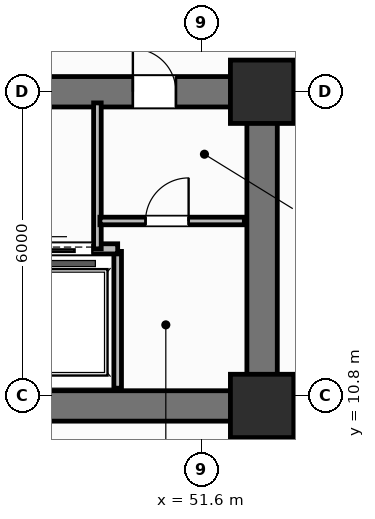
"""IFC4 building model, lengths in metres.
Left out: names, types, materials, properties, quantities, classifications, styles, units other than length and angle.
Written with IfcOpenShell. Run it as: python <this file> out.ifc"""

import sys

from ifc_helpers import new_model, si_unit, direction, frame, frame_2d, origin, origin_2d, place, context, subcontext, project, spatial, rectangle, extrude, element, fill, save


model = new_model("IFC4")
c1 = context("Model", 3, precision=1e-05, world=origin(), true_north=direction((0.0, 1.0)))
c2 = subcontext(c1, "Body", "Model", "MODEL_VIEW")
j1 = project(units=[si_unit("LENGTHUNIT", "METRE"), si_unit("PLANEANGLEUNIT", "RADIAN")], contexts=[c1])
p1 = place(None, origin())
s1 = spatial("IfcSite", under=j1, at=p1, CompositionType="ELEMENT")
p2 = place(p1, origin())
s2 = spatial("IfcBuilding", under=s1, at=p2, CompositionType="ELEMENT")
p3 = place(p2, frame((0.0, 0.0, 24.6)))
s3 = spatial("IfcBuildingStorey", under=s2, at=p3, CompositionType="ELEMENT", Elevation=24.6)
p4 = place(p3, frame((52.8, 10.6, 0.0), z_axis=(0.0, 0.0, 1.0), x_axis=(-1.0, 0.0, 0.0)))
e1 = element("IfcWall", 1, at=p4, inside=s3, PredefinedType="SHEAR", context=c2, shape_type="SweptSolid", body=[
    extrude(rectangle(XDim=27.2, YDim=0.6, at=frame_2d((13.6, 0.0))), origin(), (0.0, 0.0, 1.0), 4.2),
])
p5 = place(p3, frame((52.8, 10.9, 0.0), z_axis=(0.0, 0.0, 1.0), x_axis=(0.0, 1.0, 0.0)))
e2 = element("IfcWall", 2, at=p5, inside=s3, PredefinedType="SHEAR", context=c2, shape_type="SweptSolid", body=[
    extrude(rectangle(XDim=5.6, YDim=0.6, at=frame_2d((2.8, 0.0))), origin(), (0.0, 0.0, 1.0), 4.2),
])
p6 = place(p3, frame((25.6, 16.8, 0.0), z_axis=(0.0, 0.0, 1.0), x_axis=(1.0, 0.0, 0.0)))
e3 = element("IfcWall", 3, at=p6, inside=s3, PredefinedType="SHEAR", context=c2, shape_type="SweptSolid", body=[
    extrude(rectangle(XDim=27.2, YDim=0.6, at=frame_2d((13.6, 0.0))), origin(), (0.0, 0.0, 1.0), 4.2),
])
p7 = place(p6, frame((1.8, 0.0, 0.0)))
e4 = element("IfcOpeningElement", 4, at=p7, cuts=e3, PredefinedType="OPENING", context=c2, shape_type="SweptSolid", body=[
    extrude(rectangle(XDim=1.1, YDim=2.15, at=frame_2d((0.55, 1.075))), frame((0.0, 0.31, 0.0), z_axis=(0.0, -1.0, 0.0), x_axis=(1.0, 0.0, 0.0)), (0.0, 0.0, 1.0), 0.62),
])
p8 = place(p6, frame((5.6, 0.0, 0.0)))
e5 = element("IfcOpeningElement", 5, at=p8, cuts=e3, PredefinedType="OPENING", context=c2, shape_type="SweptSolid", body=[
    extrude(rectangle(XDim=0.85, YDim=2.1, at=frame_2d((0.425, 1.05))), frame((0.0, 0.31, 0.0), z_axis=(0.0, -1.0, 0.0), x_axis=(1.0, 0.0, 0.0)), (0.0, 0.0, 1.0), 0.62),
])
p9 = place(p6, frame((13.0, 0.0, 0.0)))
e6 = element("IfcOpeningElement", 6, at=p9, cuts=e3, PredefinedType="OPENING", context=c2, shape_type="SweptSolid", body=[
    extrude(rectangle(XDim=1.2, YDim=2.15, at=frame_2d((0.6, 1.075))), frame((0.0, 0.31, 0.0), z_axis=(0.0, -1.0, 0.0), x_axis=(1.0, 0.0, 0.0)), (0.0, 0.0, 1.0), 0.62),
])
p10 = place(p6, frame((20.4, 0.0, 0.0)))
e7 = element("IfcOpeningElement", 7, at=p10, cuts=e3, PredefinedType="OPENING", context=c2, shape_type="SweptSolid", body=[
    extrude(rectangle(XDim=1.3, YDim=2.2, at=frame_2d((0.65, 1.1))), frame((0.0, 0.31, 0.0), z_axis=(0.0, -1.0, 0.0), x_axis=(1.0, 0.0, 0.0)), (0.0, 0.0, 1.0), 0.62),
])
p11 = place(p6, frame((24.65, 0.0, 0.0)))
e8 = element("IfcOpeningElement", 8, at=p11, cuts=e3, PredefinedType="OPENING", context=c2, shape_type="SweptSolid", body=[
    extrude(rectangle(XDim=0.85, YDim=2.1, at=frame_2d((0.425, 1.05))), frame((0.0, 0.31, 0.0), z_axis=(0.0, -1.0, 0.0), x_axis=(1.0, 0.0, 0.0)), (0.0, 0.0, 1.0), 0.62),
])
for number, where, z_axis, x_axis in (
    (9, (52.8, 10.6, 0.0), (0.0, 0.0, 1.0), (1.0, 0.0, 0.0)),
    (10, (52.8, 16.8, 0.0), (0.0, 0.0, 1.0), (1.0, 0.0, 0.0)),
):
    element("IfcColumn", number, at=place(p3, frame(where, z_axis=z_axis, x_axis=x_axis)), inside=s3, PredefinedType="COLUMN", context=c2, shape_type="SweptSolid", body=[
        extrude(rectangle(XDim=1.25, YDim=1.25, at=origin_2d()), origin(), (0.0, 0.0, 1.0), 4.2),
    ])
p12 = place(p3, frame((49.95, 10.95, 0.0), z_axis=(0.0, 0.0, 1.0), x_axis=(0.0, 1.0, 0.0)))
e11 = element("IfcWall", 11, at=p12, inside=s3, PredefinedType="PARTITIONING", context=c2, shape_type="SweptSolid", body=[
    extrude(rectangle(XDim=2.7, YDim=0.15, at=frame_2d((1.35, 0.0))), origin(), (0.0, 0.0, 1.0), 3.03),
])
p13 = place(p3, frame((43.55, 13.7, 0.0), z_axis=(0.0, 0.0, 1.0), x_axis=(1.0, 0.0, 0.0)))
e12 = element("IfcWall", 12, at=p13, inside=s3, PredefinedType="PARTITIONING", context=c2, shape_type="SweptSolid", body=[
    extrude(rectangle(XDim=6.4, YDim=0.2, at=frame_2d((3.2, 0.0))), origin(), (0.0, 0.0, 1.0), 3.03),
])
p14 = place(p13, frame((0.7, 0.0, 0.0)))
e13 = element("IfcOpeningElement", 13, at=p14, cuts=e12, PredefinedType="OPENING", context=c2, shape_type="SweptSolid", body=[
    extrude(rectangle(XDim=1.0, YDim=2.15, at=frame_2d((0.5, 1.075))), frame((0.0, 0.11, 0.0), z_axis=(0.0, -1.0, 0.0), x_axis=(1.0, 0.0, 0.0)), (0.0, 0.0, 1.0), 0.22),
])
p15 = place(p13, frame((2.8, 0.0, 0.0)))
e14 = element("IfcOpeningElement", 14, at=p15, cuts=e12, PredefinedType="OPENING", context=c2, shape_type="SweptSolid", body=[
    extrude(rectangle(XDim=1.0, YDim=2.15, at=frame_2d((0.5, 1.075))), frame((0.0, 0.11, 0.0), z_axis=(0.0, -1.0, 0.0), x_axis=(1.0, 0.0, 0.0)), (0.0, 0.0, 1.0), 0.22),
])
p16 = place(p13, frame((4.9, 0.0, 0.0)))
e15 = element("IfcOpeningElement", 15, at=p16, cuts=e12, PredefinedType="OPENING", context=c2, shape_type="SweptSolid", body=[
    extrude(rectangle(XDim=1.0, YDim=2.15, at=frame_2d((0.5, 1.075))), frame((0.0, 0.11, 0.0), z_axis=(0.0, -1.0, 0.0), x_axis=(1.0, 0.0, 0.0)), (0.0, 0.0, 1.0), 0.22),
])
p17 = place(p3, frame((49.55, 13.7, 0.0), z_axis=(0.0, 0.0, 1.0), x_axis=(0.0, 1.0, 0.0)))
e16 = element("IfcWall", 16, at=p17, inside=s3, PredefinedType="PARTITIONING", context=c2, shape_type="SweptSolid", body=[
    extrude(rectangle(XDim=2.88, YDim=0.15, at=frame_2d((1.44, 0.0))), origin(), (0.0, 0.0, 1.0), 3.03),
])
p18 = place(p3, frame((49.6, 14.25, 0.0), z_axis=(0.0, 0.0, 1.0), x_axis=(1.0, 0.0, 0.0)))
e17 = element("IfcWall", 17, at=p18, inside=s3, PredefinedType="PARTITIONING", context=c2, shape_type="SweptSolid", body=[
    extrude(rectangle(XDim=2.85, YDim=0.15, at=frame_2d((1.425, 0.0))), origin(), (0.0, 0.0, 1.0), 3.03),
])
p19 = place(p18, frame((0.9, 0.0, 0.0)))
e18 = element("IfcOpeningElement", 18, at=p19, cuts=e17, PredefinedType="OPENING", context=c2, shape_type="SweptSolid", body=[
    extrude(rectangle(XDim=0.85, YDim=2.1, at=frame_2d((0.425, 1.05))), frame((0.0, 0.085, 0.0), z_axis=(0.0, -1.0, 0.0), x_axis=(1.0, 0.0, 0.0)), (0.0, 0.0, 1.0), 0.17),
])
p20 = place(p3, frame((53.1, 17.05, 0.0), z_axis=(0.0, 0.0, 1.0), x_axis=(1.0, 0.0, 0.0)))
e19 = element("IfcWall", 19, at=p20, inside=s3, PredefinedType="PARTITIONING", context=c2, shape_type="SweptSolid", body=[
    extrude(rectangle(XDim=10.73, YDim=0.2, at=frame_2d((5.365, 0.0))), origin(), (0.0, 0.0, 1.0), 3.03),
])
p21 = place(p16, origin())
e20 = element("IfcDoor", 20, at=p21, inside=s3, OperationType="SLIDING_TO_LEFT", PredefinedType="DOOR", context=c2, shape_type="SweptSolid", body=[
    extrude(rectangle(XDim=1.0, YDim=2.15, at=frame_2d((0.5, 1.075))), frame((0.0, 0.025, 0.0), z_axis=(0.0, -1.0, 0.0), x_axis=(1.0, 0.0, 0.0)), (0.0, 0.0, 1.0), 0.05),
])
fill(e15, e20)
p22 = place(p19, origin())
e21 = element("IfcDoor", 21, at=p22, inside=s3, OperationType="SINGLE_SWING_RIGHT", PredefinedType="DOOR", context=c2, shape_type="SweptSolid", body=[
    extrude(rectangle(XDim=0.85, YDim=2.1, at=frame_2d((0.425, 1.05))), frame((0.0, 0.025, 0.0), z_axis=(0.0, -1.0, 0.0), x_axis=(1.0, 0.0, 0.0)), (0.0, 0.0, 1.0), 0.05),
])
fill(e18, e21)
p23 = place(p11, origin())
e22 = element("IfcDoor", 22, at=p23, inside=s3, OperationType="SINGLE_SWING_LEFT", PredefinedType="DOOR", context=c2, shape_type="SweptSolid", body=[
    extrude(rectangle(XDim=0.85, YDim=2.1, at=frame_2d((0.425, 1.05))), frame((0.0, 0.025, 0.0), z_axis=(0.0, -1.0, 0.0), x_axis=(1.0, 0.0, 0.0)), (0.0, 0.0, 1.0), 0.05),
])
fill(e8, e22)
save(model, sys.argv[1])
